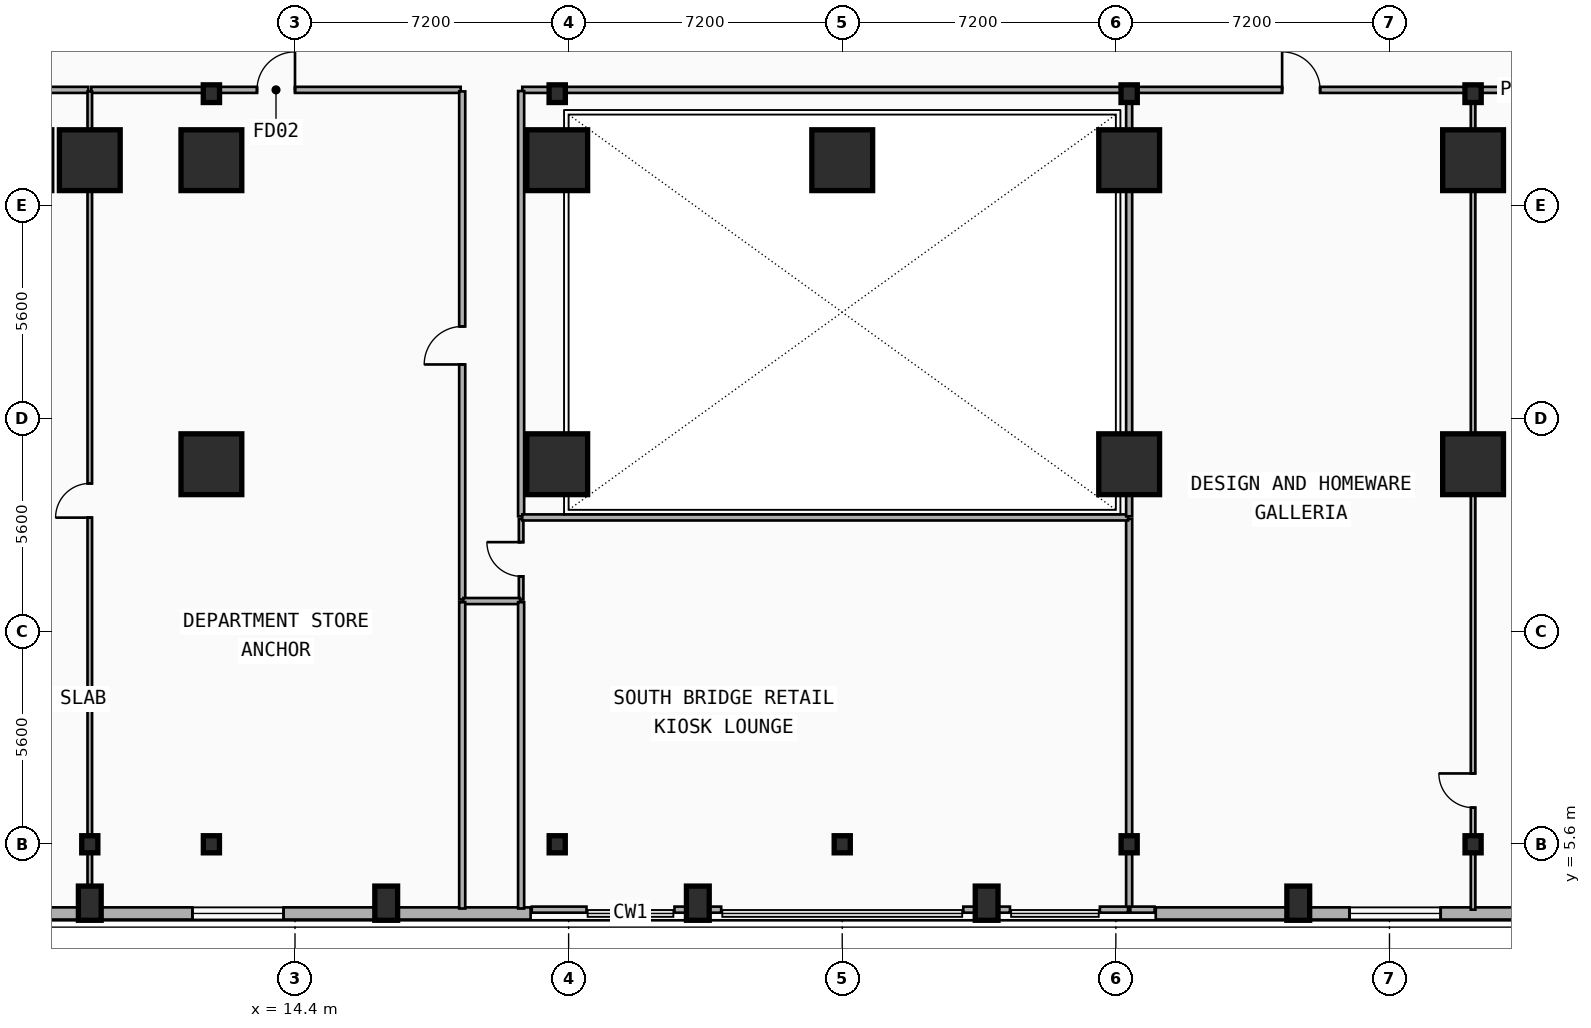
"""IFC4 building model, lengths in metres.
Left out: names, types, materials, properties, quantities, classifications, styles, units other than length and angle.
Written with IfcOpenShell. Run it as: python <this file> out.ifc"""

import sys

from ifc_helpers import new_model, si_unit, direction, frame, frame_2d, origin, origin_2d, place, context, subcontext, project, spatial, rectangle, i_section, extrude, element, fill, save


model = new_model("IFC4")
c1 = context("Model", 3, precision=1e-05, world=origin(), true_north=direction((0.0, 1.0)))
c2 = subcontext(c1, "Body", "Model", "MODEL_VIEW")
j1 = project(units=[si_unit("LENGTHUNIT", "METRE"), si_unit("PLANEANGLEUNIT", "RADIAN")], contexts=[c1])
p1 = place(None, origin())
s1 = spatial("IfcSite", under=j1, at=p1, CompositionType="ELEMENT")
p2 = place(p1, origin())
s2 = spatial("IfcBuilding", under=s1, at=p2, CompositionType="ELEMENT")
p3 = place(p2, frame((0.0, 0.0, 10.4)))
s3 = spatial("IfcBuildingStorey", under=s2, at=p3, CompositionType="ELEMENT", Elevation=10.4)
for number, where, z_axis, x_axis in (
    (1, (12.2, 25.35, 0.0), (0.0, 0.0, 1.0), (1.0, 0.0, 0.0)),
    (2, (21.3, 25.35, 0.0), (0.0, 0.0, 1.0), (1.0, 0.0, 0.0)),
    (3, (36.35, 25.35, 0.0), (0.0, 0.0, 1.0), (1.0, 0.0, 0.0)),
    (4, (45.4, 25.35, 0.0), (0.0, 0.0, 1.0), (1.0, 0.0, 0.0)),
):
    element("IfcColumn", number, at=place(p3, frame(where, z_axis=z_axis, x_axis=x_axis)), inside=s3, PredefinedType="COLUMN", context=c2, shape_type="SweptSolid", body=[
        extrude(i_section(OverallWidth=0.428, OverallDepth=0.465, WebThickness=0.045, FlangeThickness=0.073, FilletRadius=0.015, at=origin_2d()), origin(), (0.0, 0.0, 1.0), 4.5),
    ])
p4 = place(p3, frame((9.0, 5.6, 0.0), z_axis=(0.0, 0.0, 1.0), x_axis=(1.0, 0.0, 0.0)))
e5 = element("IfcColumn", 5, at=p4, inside=s3, PredefinedType="COLUMN", context=c2, shape_type="SweptSolid", body=[
    extrude(i_section(OverallWidth=0.424, OverallDepth=0.45, WebThickness=0.041, FlangeThickness=0.065, FilletRadius=0.015, at=origin_2d()), origin(), (0.0, 0.0, 1.0), 4.5),
])
p5 = place(p3, frame((9.0, 23.6, 0.0), z_axis=(0.0, 0.0, 1.0), x_axis=(1.0, 0.0, 0.0)))
e6 = element("IfcColumn", 6, at=p5, inside=s3, PredefinedType="COLUMN", context=c2, shape_type="SweptSolid", body=[
    extrude(rectangle(XDim=1.6, YDim=1.6, at=origin_2d()), origin(), (0.0, 0.0, 1.0), 4.5),
])
p6 = place(p3, frame((12.2, 5.6, 0.0), z_axis=(0.0, 0.0, 1.0), x_axis=(1.0, 0.0, 0.0)))
e7 = element("IfcColumn", 7, at=p6, inside=s3, PredefinedType="COLUMN", context=c2, shape_type="SweptSolid", body=[
    extrude(i_section(OverallWidth=0.424, OverallDepth=0.45, WebThickness=0.041, FlangeThickness=0.065, FilletRadius=0.015, at=origin_2d()), origin(), (0.0, 0.0, 1.0), 4.5),
])
for number, where, z_axis, x_axis in (
    (8, (12.2, 15.6, 0.0), (0.0, 0.0, 1.0), (1.0, 0.0, 0.0)),
    (9, (12.2, 23.6, 0.0), (0.0, 0.0, 1.0), (1.0, 0.0, 0.0)),
):
    element("IfcColumn", number, at=place(p3, frame(where, z_axis=z_axis, x_axis=x_axis)), inside=s3, PredefinedType="COLUMN", context=c2, shape_type="SweptSolid", body=[
        extrude(rectangle(XDim=1.6, YDim=1.6, at=origin_2d()), origin(), (0.0, 0.0, 1.0), 4.5),
    ])
p7 = place(p3, frame((21.3, 5.6, 0.0), z_axis=(0.0, 0.0, 1.0), x_axis=(1.0, 0.0, 0.0)))
e10 = element("IfcColumn", 10, at=p7, inside=s3, PredefinedType="COLUMN", context=c2, shape_type="SweptSolid", body=[
    extrude(i_section(OverallWidth=0.424, OverallDepth=0.45, WebThickness=0.041, FlangeThickness=0.065, FilletRadius=0.015, at=origin_2d()), origin(), (0.0, 0.0, 1.0), 4.5),
])
for number, where, z_axis, x_axis in (
    (11, (21.3, 15.6, 0.0), (0.0, 0.0, 1.0), (1.0, 0.0, 0.0)),
    (12, (21.3, 23.6, 0.0), (0.0, 0.0, 1.0), (1.0, 0.0, 0.0)),
):
    element("IfcColumn", number, at=place(p3, frame(where, z_axis=z_axis, x_axis=x_axis)), inside=s3, PredefinedType="COLUMN", context=c2, shape_type="SweptSolid", body=[
        extrude(rectangle(XDim=1.6, YDim=1.6, at=origin_2d()), origin(), (0.0, 0.0, 1.0), 4.5),
    ])
p8 = place(p3, frame((28.8, 5.6, 0.0), z_axis=(0.0, 0.0, 1.0), x_axis=(1.0, 0.0, 0.0)))
e13 = element("IfcColumn", 13, at=p8, inside=s3, PredefinedType="COLUMN", context=c2, shape_type="SweptSolid", body=[
    extrude(i_section(OverallWidth=0.424, OverallDepth=0.45, WebThickness=0.041, FlangeThickness=0.065, FilletRadius=0.015, at=origin_2d()), origin(), (0.0, 0.0, 1.0), 4.5),
])
p9 = place(p3, frame((28.8, 23.6, 0.0), z_axis=(0.0, 0.0, 1.0), x_axis=(1.0, 0.0, 0.0)))
e14 = element("IfcColumn", 14, at=p9, inside=s3, PredefinedType="COLUMN", context=c2, shape_type="SweptSolid", body=[
    extrude(rectangle(XDim=1.6, YDim=1.6, at=origin_2d()), origin(), (0.0, 0.0, 1.0), 4.5),
])
p10 = place(p3, frame((36.35, 5.6, 0.0), z_axis=(0.0, 0.0, 1.0), x_axis=(1.0, 0.0, 0.0)))
e15 = element("IfcColumn", 15, at=p10, inside=s3, PredefinedType="COLUMN", context=c2, shape_type="SweptSolid", body=[
    extrude(i_section(OverallWidth=0.424, OverallDepth=0.45, WebThickness=0.041, FlangeThickness=0.065, FilletRadius=0.015, at=origin_2d()), origin(), (0.0, 0.0, 1.0), 4.5),
])
for number, where, z_axis, x_axis in (
    (16, (36.35, 15.6, 0.0), (0.0, 0.0, 1.0), (1.0, 0.0, 0.0)),
    (17, (36.35, 23.6, 0.0), (0.0, 0.0, 1.0), (1.0, 0.0, 0.0)),
):
    element("IfcColumn", number, at=place(p3, frame(where, z_axis=z_axis, x_axis=x_axis)), inside=s3, PredefinedType="COLUMN", context=c2, shape_type="SweptSolid", body=[
        extrude(rectangle(XDim=1.6, YDim=1.6, at=origin_2d()), origin(), (0.0, 0.0, 1.0), 4.5),
    ])
p11 = place(p3, frame((45.4, 5.6, 0.0), z_axis=(0.0, 0.0, 1.0), x_axis=(1.0, 0.0, 0.0)))
e18 = element("IfcColumn", 18, at=p11, inside=s3, PredefinedType="COLUMN", context=c2, shape_type="SweptSolid", body=[
    extrude(i_section(OverallWidth=0.424, OverallDepth=0.45, WebThickness=0.041, FlangeThickness=0.065, FilletRadius=0.015, at=origin_2d()), origin(), (0.0, 0.0, 1.0), 4.5),
])
for number, where, z_axis, x_axis in (
    (19, (45.4, 15.6, 0.0), (0.0, 0.0, 1.0), (1.0, 0.0, 0.0)),
    (20, (45.4, 23.6, 0.0), (0.0, 0.0, 1.0), (1.0, 0.0, 0.0)),
):
    element("IfcColumn", number, at=place(p3, frame(where, z_axis=z_axis, x_axis=x_axis)), inside=s3, PredefinedType="COLUMN", context=c2, shape_type="SweptSolid", body=[
        extrude(rectangle(XDim=1.6, YDim=1.6, at=origin_2d()), origin(), (0.0, 0.0, 1.0), 4.5),
    ])
for number, where, z_axis, x_axis in (
    (21, (9.0, 4.05, 0.0), (0.0, 0.0, 1.0), (1.0, 0.0, 0.0)),
    (22, (16.8, 4.05, 0.0), (0.0, 0.0, 1.0), (1.0, 0.0, 0.0)),
    (23, (25.0, 4.05, 0.0), (0.0, 0.0, 1.0), (1.0, 0.0, 0.0)),
    (24, (32.6, 4.05, 0.0), (0.0, 0.0, 1.0), (1.0, 0.0, 0.0)),
    (25, (40.8, 4.05, 0.0), (0.0, 0.0, 1.0), (1.0, 0.0, 0.0)),
):
    element("IfcColumn", number, at=place(p3, frame(where, z_axis=z_axis, x_axis=x_axis)), inside=s3, PredefinedType="PILASTER", context=c2, shape_type="SweptSolid", body=[
        extrude(rectangle(XDim=0.6, YDim=0.9, at=origin_2d()), origin(), (0.0, 0.0, 1.0), 4.5),
    ])
p12 = place(p3, frame((20.6, 3.78, 0.0), z_axis=(0.0, 0.0, 1.0), x_axis=(-1.0, 0.0, 0.0)))
e26 = element("IfcWall", 26, at=p12, inside=s3, PredefinedType="SOLIDWALL", context=c2, shape_type="SweptSolid", body=[
    extrude(rectangle(XDim=17.0, YDim=0.32, at=frame_2d((8.5, 0.0))), origin(), (0.0, 0.0, 1.0), 4.2),
])
p13 = place(p12, frame((13.338, 0.0, 0.9)))
e27 = element("IfcOpeningElement", 27, at=p13, cuts=e26, PredefinedType="OPENING", context=c2, shape_type="SweptSolid", body=[
    extrude(rectangle(XDim=2.4, YDim=1.8, at=frame_2d((1.2, 0.9))), frame((0.0, 0.17, 0.0), z_axis=(0.0, -1.0, 0.0), x_axis=(1.0, 0.0, 0.0)), (0.0, 0.0, 1.0), 0.34),
])
p14 = place(p12, frame((6.5, 0.0, 0.9)))
e28 = element("IfcOpeningElement", 28, at=p14, cuts=e26, PredefinedType="OPENING", context=c2, shape_type="SweptSolid", body=[
    extrude(rectangle(XDim=2.4, YDim=1.8, at=frame_2d((1.2, 0.9))), frame((0.0, 0.17, 0.0), z_axis=(0.0, -1.0, 0.0), x_axis=(1.0, 0.0, 0.0)), (0.0, 0.0, 1.0), 0.34),
])
p15 = place(p3, frame((54.0, 3.78, 0.0), z_axis=(0.0, 0.0, 1.0), x_axis=(-1.0, 0.0, 0.0)))
e29 = element("IfcWall", 29, at=p15, inside=s3, PredefinedType="SOLIDWALL", context=c2, shape_type="SweptSolid", body=[
    extrude(rectangle(XDim=16.95, YDim=0.32, at=frame_2d((8.475, 0.0))), origin(), (0.0, 0.0, 1.0), 4.2),
])
p16 = place(p15, frame((9.452, 0.0, 0.9)))
e30 = element("IfcOpeningElement", 30, at=p16, cuts=e29, PredefinedType="OPENING", context=c2, shape_type="SweptSolid", body=[
    extrude(rectangle(XDim=2.4, YDim=1.8, at=frame_2d((1.2, 0.9))), frame((0.0, 0.17, 0.0), z_axis=(0.0, -1.0, 0.0), x_axis=(1.0, 0.0, 0.0)), (0.0, 0.0, 1.0), 0.34),
])
p17 = place(p15, frame((1.262, 0.0, 0.9)))
e31 = element("IfcOpeningElement", 31, at=p17, cuts=e29, PredefinedType="OPENING", context=c2, shape_type="SweptSolid", body=[
    extrude(rectangle(XDim=2.4, YDim=1.8, at=frame_2d((1.2, 0.9))), frame((0.0, 0.17, 0.0), z_axis=(0.0, -1.0, 0.0), x_axis=(1.0, 0.0, 0.0)), (0.0, 0.0, 1.0), 0.34),
])
p18 = place(p3, frame((0.28, 25.45, 0.0), z_axis=(0.0, 0.0, 1.0), x_axis=(1.0, 0.0, 0.0)))
e32 = element("IfcWall", 32, at=p18, inside=s3, PredefinedType="PARTITIONING", context=c2, shape_type="SweptSolid", body=[
    extrude(rectangle(XDim=8.68, YDim=0.16, at=frame_2d((4.34, 0.0))), origin(), (0.0, 0.0, 1.0), 4.2),
])
p19 = place(p3, frame((9.04, 25.45, 0.0), z_axis=(0.0, 0.0, 1.0), x_axis=(1.0, 0.0, 0.0)))
e33 = element("IfcWall", 33, at=p19, inside=s3, PredefinedType="PARTITIONING", context=c2, shape_type="SweptSolid", body=[
    extrude(rectangle(XDim=9.72, YDim=0.16, at=frame_2d((4.86, 0.0))), origin(), (0.0, 0.0, 1.0), 3.366),
])
p20 = place(p19, frame((4.36, 0.0, 0.0)))
e34 = element("IfcOpeningElement", 34, at=p20, cuts=e33, PredefinedType="OPENING", context=c2, shape_type="SweptSolid", body=[
    extrude(rectangle(XDim=1.0, YDim=2.15, at=frame_2d((0.5, 1.075))), frame((0.0, 0.09, 0.0), z_axis=(0.0, -1.0, 0.0), x_axis=(1.0, 0.0, 0.0)), (0.0, 0.0, 1.0), 0.18),
])
p21 = place(p3, frame((36.39, 25.45, 0.0), z_axis=(0.0, 0.0, 1.0), x_axis=(1.0, 0.0, 0.0)))
e35 = element("IfcWall", 35, at=p21, inside=s3, PredefinedType="PARTITIONING", context=c2, shape_type="SweptSolid", body=[
    extrude(rectangle(XDim=8.97, YDim=0.16, at=frame_2d((4.485, 0.0))), origin(), (0.0, 0.0, 1.0), 3.366),
])
p22 = place(p21, frame((3.985, 0.0, 0.0)))
e36 = element("IfcOpeningElement", 36, at=p22, cuts=e35, PredefinedType="OPENING", context=c2, shape_type="SweptSolid", body=[
    extrude(rectangle(XDim=1.0, YDim=2.15, at=frame_2d((0.5, 1.075))), frame((0.0, 0.09, 0.0), z_axis=(0.0, -1.0, 0.0), x_axis=(1.0, 0.0, 0.0)), (0.0, 0.0, 1.0), 0.18),
])
p23 = place(p3, frame((45.44, 25.45, 0.0), z_axis=(0.0, 0.0, 1.0), x_axis=(1.0, 0.0, 0.0)))
e37 = element("IfcWall", 37, at=p23, inside=s3, PredefinedType="PARTITIONING", context=c2, shape_type="SweptSolid", body=[
    extrude(rectangle(XDim=2.57, YDim=0.16, at=frame_2d((1.285, 0.0))), origin(), (0.0, 0.0, 1.0), 3.366),
])
p24 = place(p3, frame((18.8, 12.04, 0.0), z_axis=(0.0, 0.0, 1.0), x_axis=(0.0, 1.0, 0.0)))
e38 = element("IfcWall", 38, at=p24, inside=s3, PredefinedType="PARTITIONING", context=c2, shape_type="SweptSolid", body=[
    extrude(rectangle(XDim=13.37, YDim=0.16, at=frame_2d((6.685, 0.0))), origin(), (0.0, 0.0, 1.0), 3.172),
])
p25 = place(p24, frame((6.185, 0.0, 0.0)))
e39 = element("IfcOpeningElement", 39, at=p25, cuts=e38, PredefinedType="OPENING", context=c2, shape_type="SweptSolid", body=[
    extrude(rectangle(XDim=1.0, YDim=2.15, at=frame_2d((0.5, 1.075))), frame((0.0, 0.09, 0.0), z_axis=(0.0, -1.0, 0.0), x_axis=(1.0, 0.0, 0.0)), (0.0, 0.0, 1.0), 0.18),
])
p26 = place(p3, frame((20.35, 12.04, 0.0), z_axis=(0.0, 0.0, 1.0), x_axis=(0.0, 1.0, 0.0)))
e40 = element("IfcWall", 40, at=p26, inside=s3, PredefinedType="PARTITIONING", context=c2, shape_type="SweptSolid", body=[
    extrude(rectangle(XDim=2.12, YDim=0.12, at=frame_2d((1.06, 0.0))), origin(), (0.0, 0.0, 1.0), 3.82),
])
p27 = place(p26, frame((0.61, 0.0, 0.0)))
e41 = element("IfcOpeningElement", 41, at=p27, cuts=e40, PredefinedType="OPENING", context=c2, shape_type="SweptSolid", body=[
    extrude(rectangle(XDim=0.9, YDim=2.1, at=frame_2d((0.45, 1.05))), frame((0.0, 0.07, 0.0), z_axis=(0.0, -1.0, 0.0), x_axis=(1.0, 0.0, 0.0)), (0.0, 0.0, 1.0), 0.14),
])
p28 = place(p3, frame((9.0, 3.88, 0.0), z_axis=(0.0, 0.0, 1.0), x_axis=(0.0, 1.0, 0.0)))
e42 = element("IfcWall", 42, at=p28, inside=s3, PredefinedType="PARTITIONING", context=c2, shape_type="SweptSolid", body=[
    extrude(rectangle(XDim=21.53, YDim=0.12, at=frame_2d((10.765, 0.0))), origin(), (0.0, 0.0, 1.0), 3.53),
])
p29 = place(p28, frame((10.315, 0.0, 0.0)))
e43 = element("IfcOpeningElement", 43, at=p29, cuts=e42, PredefinedType="OPENING", context=c2, shape_type="SweptSolid", body=[
    extrude(rectangle(XDim=0.9, YDim=2.1, at=frame_2d((0.45, 1.05))), frame((0.0, 0.07, 0.0), z_axis=(0.0, -1.0, 0.0), x_axis=(1.0, 0.0, 0.0)), (0.0, 0.0, 1.0), 0.14),
])
p30 = place(p3, frame((36.35, 3.88, 0.0), z_axis=(0.0, 0.0, 1.0), x_axis=(0.0, 1.0, 0.0)))
e44 = element("IfcWall", 44, at=p30, inside=s3, PredefinedType="PARTITIONING", context=c2, shape_type="SweptSolid", body=[
    extrude(rectangle(XDim=10.28, YDim=0.16, at=frame_2d((5.14, 0.0))), origin(), (0.0, 0.0, 1.0), 3.366),
])
p31 = place(p3, frame((45.4, 3.88, 0.0), z_axis=(0.0, 0.0, 1.0), x_axis=(0.0, 1.0, 0.0)))
e45 = element("IfcWall", 45, at=p31, inside=s3, PredefinedType="PARTITIONING", context=c2, shape_type="SweptSolid", body=[
    extrude(rectangle(XDim=21.53, YDim=0.12, at=frame_2d((10.765, 0.0))), origin(), (0.0, 0.0, 1.0), 3.172),
])
p32 = place(p31, frame((2.684, 0.0, 0.0)))
e46 = element("IfcOpeningElement", 46, at=p32, cuts=e45, PredefinedType="OPENING", context=c2, shape_type="SweptSolid", body=[
    extrude(rectangle(XDim=0.9, YDim=2.1, at=frame_2d((0.45, 1.05))), frame((0.0, 0.07, 0.0), z_axis=(0.0, -1.0, 0.0), x_axis=(1.0, 0.0, 0.0)), (0.0, 0.0, 1.0), 0.14),
])
p33 = place(p3, frame((20.38, 25.45, 0.0), z_axis=(0.0, 0.0, 1.0), x_axis=(1.0, 0.0, 0.0)))
e47 = element("IfcWall", 47, at=p33, inside=s3, PredefinedType="PARTITIONING", context=c2, shape_type="SweptSolid", body=[
    extrude(rectangle(XDim=15.94, YDim=0.16, at=frame_2d((7.97, 0.0))), origin(), (0.0, 0.0, 1.0), 3.366),
])
p34 = place(p3, frame((18.83, 12.0, 0.0), z_axis=(0.0, 0.0, 1.0), x_axis=(1.0, 0.0, 0.0)))
e48 = element("IfcWall", 48, at=p34, inside=s3, PredefinedType="PARTITIONING", context=c2, shape_type="SweptSolid", body=[
    extrude(rectangle(XDim=1.49, YDim=0.16, at=frame_2d((0.745, 0.0))), origin(), (0.0, 0.0, 1.0), 3.82),
])
p35 = place(p3, frame((20.35, 14.23, 0.0), z_axis=(0.0, 0.0, 1.0), x_axis=(0.0, 1.0, 0.0)))
e49 = element("IfcWall", 49, at=p35, inside=s3, PredefinedType="PARTITIONING", context=c2, shape_type="SweptSolid", body=[
    extrude(rectangle(XDim=11.19, YDim=0.16, at=frame_2d((5.595, 0.0))), origin(), (0.0, 0.0, 1.0), 3.172),
])
p36 = place(p3, frame((18.8, 3.91, 0.0), z_axis=(0.0, 0.0, 1.0), x_axis=(0.0, 1.0, 0.0)))
e50 = element("IfcWall", 50, at=p36, inside=s3, PredefinedType="PARTITIONING", context=c2, shape_type="SweptSolid", body=[
    extrude(rectangle(XDim=8.06, YDim=0.16, at=frame_2d((4.03, 0.0))), origin(), (0.0, 0.0, 1.0), 3.53),
])
p37 = place(p3, frame((20.63, 3.88, 0.0), z_axis=(0.0, 0.0, 1.0), x_axis=(1.0, 0.0, 0.0)))
e51 = element("IfcWall", 51, at=p37, inside=s3, PredefinedType="PARTITIONING", context=c2, shape_type="SweptSolid", body=[
    extrude(rectangle(XDim=1.44, YDim=0.16, at=frame_2d((0.72, 0.0))), origin(), (0.0, 0.0, 1.0), 4.2),
])
for number, where, z_axis, x_axis in (
    (52, (24.386, 3.88, 0.0), (0.0, 0.0, 1.0), (1.0, 0.0, 0.0)),
    (53, (31.986, 3.88, 0.0), (0.0, 0.0, 1.0), (1.0, 0.0, 0.0)),
):
    element("IfcWall", number, at=place(p3, frame(where, z_axis=z_axis, x_axis=x_axis)), inside=s3, PredefinedType="PARTITIONING", context=c2, shape_type="SweptSolid", body=[
        extrude(rectangle(XDim=1.228, YDim=0.16, at=frame_2d((0.614, 0.0))), origin(), (0.0, 0.0, 1.0), 4.2),
    ])
p38 = place(p3, frame((35.58, 3.88, 0.0), z_axis=(0.0, 0.0, 1.0), x_axis=(1.0, 0.0, 0.0)))
e54 = element("IfcWall", 54, at=p38, inside=s3, PredefinedType="PARTITIONING", context=c2, shape_type="SweptSolid", body=[
    extrude(rectangle(XDim=0.74, YDim=0.16, at=frame_2d((0.37, 0.0))), origin(), (0.0, 0.0, 1.0), 4.2),
])
p39 = place(p3, frame((20.38, 14.2, 0.0), z_axis=(0.0, 0.0, 1.0), x_axis=(1.0, 0.0, 0.0)))
e55 = element("IfcWall", 55, at=p39, inside=s3, PredefinedType="PARTITIONING", context=c2, shape_type="SweptSolid", body=[
    extrude(rectangle(XDim=15.94, YDim=0.16, at=frame_2d((7.97, 0.0))), origin(), (0.0, 0.0, 1.0), 3.366),
])
p40 = place(p3, frame((20.35, 3.91, 0.0), z_axis=(0.0, 0.0, 1.0), x_axis=(0.0, 1.0, 0.0)))
e56 = element("IfcWall", 56, at=p40, inside=s3, PredefinedType="PARTITIONING", context=c2, shape_type="SweptSolid", body=[
    extrude(rectangle(XDim=8.06, YDim=0.16, at=frame_2d((4.03, 0.0))), origin(), (0.0, 0.0, 1.0), 3.53),
])
p41 = place(p3, frame((36.38, 3.88, 0.0), z_axis=(0.0, 0.0, 1.0), x_axis=(1.0, 0.0, 0.0)))
e57 = element("IfcWall", 57, at=p41, inside=s3, PredefinedType="PARTITIONING", context=c2, shape_type="SweptSolid", body=[
    extrude(rectangle(XDim=0.64, YDim=0.16, at=frame_2d((0.32, 0.0))), origin(), (0.0, 0.0, 1.0), 4.2),
])
p42 = place(p3, frame((36.35, 14.23, 0.0), z_axis=(0.0, 0.0, 1.0), x_axis=(0.0, 1.0, 0.0)))
e58 = element("IfcWall", 58, at=p42, inside=s3, PredefinedType="PARTITIONING", context=c2, shape_type="SweptSolid", body=[
    extrude(rectangle(XDim=11.19, YDim=0.16, at=frame_2d((5.595, 0.0))), origin(), (0.0, 0.0, 1.0), 3.172),
])
p43 = place(p14, origin())
e59 = element("IfcWindow", 59, at=p43, inside=s3, PartitioningType="SINGLE_PANEL", PredefinedType="WINDOW", context=c2, shape_type="SweptSolid", body=[
    extrude(rectangle(XDim=2.4, YDim=1.8, at=frame_2d((1.2, 0.9))), frame((0.0, 0.03, 0.0), z_axis=(0.0, -1.0, 0.0), x_axis=(1.0, 0.0, 0.0)), (0.0, 0.0, 1.0), 0.06),
])
fill(e28, e59)
p44 = place(p16, origin())
e60 = element("IfcWindow", 60, at=p44, inside=s3, PartitioningType="SINGLE_PANEL", PredefinedType="WINDOW", context=c2, shape_type="SweptSolid", body=[
    extrude(rectangle(XDim=2.4, YDim=1.8, at=frame_2d((1.2, 0.9))), frame((0.0, 0.03, 0.0), z_axis=(0.0, -1.0, 0.0), x_axis=(1.0, 0.0, 0.0)), (0.0, 0.0, 1.0), 0.06),
])
fill(e30, e60)
p45 = place(p20, origin())
e61 = element("IfcDoor", 61, at=p45, inside=s3, OperationType="SINGLE_SWING_RIGHT", PredefinedType="DOOR", context=c2, shape_type="SweptSolid", body=[
    extrude(rectangle(XDim=1.0, YDim=2.15, at=frame_2d((0.5, 1.075))), frame((0.0, 0.025, 0.0), z_axis=(0.0, -1.0, 0.0), x_axis=(1.0, 0.0, 0.0)), (0.0, 0.0, 1.0), 0.05),
])
fill(e34, e61)
p46 = place(p22, origin())
e62 = element("IfcDoor", 62, at=p46, inside=s3, OperationType="SINGLE_SWING_LEFT", PredefinedType="DOOR", context=c2, shape_type="SweptSolid", body=[
    extrude(rectangle(XDim=1.0, YDim=2.15, at=frame_2d((0.5, 1.075))), frame((0.0, 0.025, 0.0), z_axis=(0.0, -1.0, 0.0), x_axis=(1.0, 0.0, 0.0)), (0.0, 0.0, 1.0), 0.05),
])
fill(e36, e62)
p47 = place(p25, origin())
e63 = element("IfcDoor", 63, at=p47, inside=s3, OperationType="SINGLE_SWING_LEFT", PredefinedType="DOOR", context=c2, shape_type="SweptSolid", body=[
    extrude(rectangle(XDim=1.0, YDim=2.15, at=frame_2d((0.5, 1.075))), frame((0.0, 0.025, 0.0), z_axis=(0.0, -1.0, 0.0), x_axis=(1.0, 0.0, 0.0)), (0.0, 0.0, 1.0), 0.05),
])
fill(e39, e63)
p48 = place(p27, origin())
e64 = element("IfcDoor", 64, at=p48, inside=s3, OperationType="SINGLE_SWING_RIGHT", PredefinedType="DOOR", context=c2, shape_type="SweptSolid", body=[
    extrude(rectangle(XDim=0.9, YDim=2.1, at=frame_2d((0.45, 1.05))), frame((0.0, 0.025, 0.0), z_axis=(0.0, -1.0, 0.0), x_axis=(1.0, 0.0, 0.0)), (0.0, 0.0, 1.0), 0.05),
])
fill(e41, e64)
p49 = place(p29, origin())
e65 = element("IfcDoor", 65, at=p49, inside=s3, OperationType="SINGLE_SWING_LEFT", PredefinedType="DOOR", context=c2, shape_type="SweptSolid", body=[
    extrude(rectangle(XDim=0.9, YDim=2.1, at=frame_2d((0.45, 1.05))), frame((0.0, 0.025, 0.0), z_axis=(0.0, -1.0, 0.0), x_axis=(1.0, 0.0, 0.0)), (0.0, 0.0, 1.0), 0.05),
])
fill(e43, e65)
p50 = place(p32, origin())
e66 = element("IfcDoor", 66, at=p50, inside=s3, OperationType="SINGLE_SWING_RIGHT", PredefinedType="DOOR", context=c2, shape_type="SweptSolid", body=[
    extrude(rectangle(XDim=0.9, YDim=2.1, at=frame_2d((0.45, 1.05))), frame((0.0, 0.025, 0.0), z_axis=(0.0, -1.0, 0.0), x_axis=(1.0, 0.0, 0.0)), (0.0, 0.0, 1.0), 0.05),
])
fill(e46, e66)
save(model, sys.argv[1])
